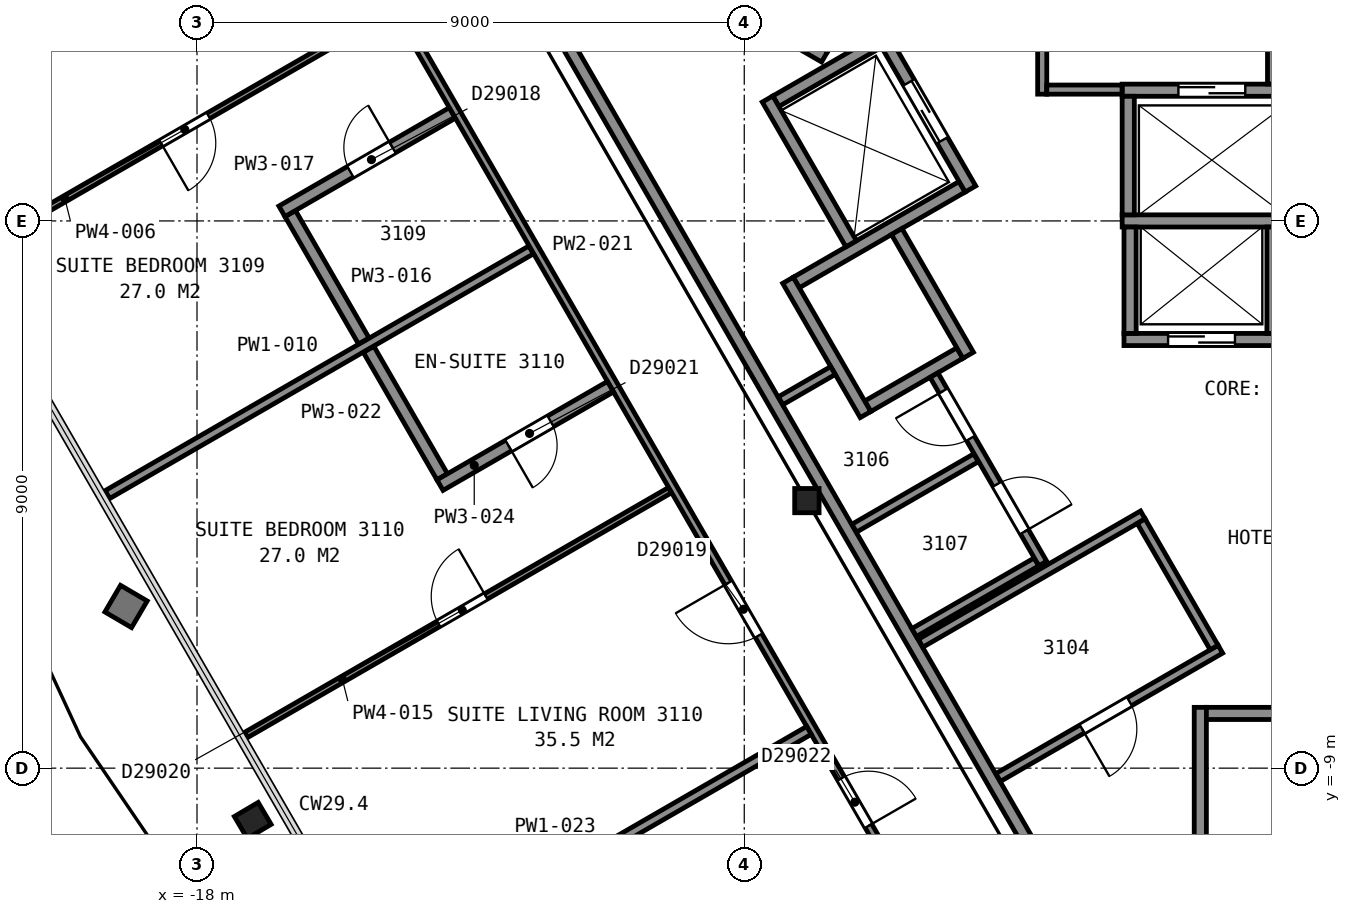
"""IFC4 building model, lengths in metres.
Left out: names, types, materials, properties, quantities, classifications, styles, units other than length and angle.
Written with IfcOpenShell. Run it as: python <this file> out.ifc"""

import sys

from ifc_helpers import new_model, si_unit, direction, frame, frame_2d, origin, origin_2d, place, context, subcontext, project, spatial, rectangle, i_section, extrude, element, fill, save


model = new_model("IFC4")
c1 = context("Model", 3, precision=1e-05, world=origin(), true_north=direction((0.0, 1.0)))
c2 = subcontext(c1, "Body", "Model", "MODEL_VIEW")
j1 = project(units=[si_unit("LENGTHUNIT", "METRE"), si_unit("PLANEANGLEUNIT", "RADIAN")], contexts=[c1])
p1 = place(None, origin())
s1 = spatial("IfcSite", under=j1, at=p1, CompositionType="ELEMENT")
p2 = place(p1, origin())
s2 = spatial("IfcBuilding", under=s1, at=p2, CompositionType="ELEMENT")
p3 = place(p2, frame((0.0, 0.0, 128.8)))
s3 = spatial("IfcBuildingStorey", under=s2, at=p3, CompositionType="ELEMENT", Elevation=128.8)
p4 = place(p3, frame((-16.886, -9.743, 0.035), z_axis=(-0.166257050151, -0.0981255896, 0.981188035975), x_axis=(-0.500024449769, 0.866009245638, 0.001880452815)))
e1 = element("IfcColumn", 1, at=p4, inside=s3, PredefinedType="COLUMN", context=c2, shape_type="SweptSolid", body=[
    extrude(i_section(OverallWidth=0.419, OverallDepth=0.455, WebThickness=0.042, FlangeThickness=0.068, FilletRadius=0.015, at=origin_2d()), origin(), (0.0, 0.0, 1.0), 3.598),
])
p5 = place(p3, frame((-7.97, -4.6, 0.0), z_axis=(0.0, 0.0, 1.0), x_axis=(1.0, 0.0, 0.0)))
e2 = element("IfcColumn", 2, at=p5, inside=s3, PredefinedType="COLUMN", context=c2, shape_type="SweptSolid", body=[
    extrude(i_section(OverallWidth=0.401, OverallDepth=0.399, WebThickness=0.025, FlangeThickness=0.04, FilletRadius=0.015, at=origin_2d()), origin(), (0.0, 0.0, 1.0), 3.6),
])
for number, where, z_axis, x_axis in (
    (3, (-7.678, 2.701, 0.0), (0.0, 0.0, 1.0), (-0.866, 0.5, 0.0)),
    (4, (-1.5, -8.0, 0.0), (0.0, 0.0, 1.0), (0.0, -1.0, 0.0)),
):
    element("IfcWall", number, at=place(p3, frame(where, z_axis=z_axis, x_axis=x_axis)), inside=s3, PredefinedType="PARTITIONING", context=c2, shape_type="SweptSolid", body=[
        extrude(rectangle(XDim=12.0, YDim=0.2, at=frame_2d((6.0, 0.0))), origin(), (0.0, 0.0, 1.0), 3.35),
    ])
p6 = place(p3, frame((-1.4, -8.1, 0.0), z_axis=(0.0, 0.0, 1.0), x_axis=(1.0, 0.0, 0.0)))
e5 = element("IfcWall", 5, at=p6, inside=s3, PredefinedType="PARTITIONING", context=c2, shape_type="SweptSolid", body=[
    extrude(rectangle(XDim=2.8, YDim=0.2, at=frame_2d((1.4, 0.0))), origin(), (0.0, 0.0, 1.0), 3.35),
])
p7 = place(p3, frame((-2.755, -1.95, 0.0), z_axis=(0.0, 0.0, 1.0), x_axis=(1.0, 0.0, 0.0)))
e6 = element("IfcWall", 6, at=p7, inside=s3, PredefinedType="PARTITIONING", context=c2, shape_type="SweptSolid", body=[
    extrude(rectangle(XDim=2.55, YDim=0.2, at=frame_2d((1.275, 0.0))), origin(), (0.0, 0.0, 1.0), 3.6),
])
p8 = place(p7, frame((0.725, 0.0, 0.0)))
e7 = element("IfcOpeningElement", 7, at=p8, cuts=e6, PredefinedType="OPENING", context=c2, shape_type="SweptSolid", body=[
    extrude(rectangle(XDim=1.1, YDim=2.1, at=frame_2d((0.55, 1.05))), frame((0.0, 0.11, 0.0), z_axis=(0.0, -1.0, 0.0), x_axis=(1.0, 0.0, 0.0)), (0.0, 0.0, 1.0), 0.22),
])
p9 = place(p3, frame((-2.785, 0.0, 0.0), z_axis=(0.0, 0.0, 1.0), x_axis=(1.0, 0.0, 0.0)))
e8 = element("IfcWall", 8, at=p9, inside=s3, PredefinedType="PARTITIONING", context=c2, shape_type="SweptSolid", body=[
    extrude(rectangle(XDim=2.95, YDim=0.2, at=frame_2d((1.475, 0.0))), origin(), (0.0, 0.0, 1.0), 3.6),
])
p10 = place(p3, frame((-2.785, 2.15, 0.0), z_axis=(0.0, 0.0, 1.0), x_axis=(1.0, 0.0, 0.0)))
e9 = element("IfcWall", 9, at=p10, inside=s3, PredefinedType="PARTITIONING", context=c2, shape_type="SweptSolid", body=[
    extrude(rectangle(XDim=2.95, YDim=0.2, at=frame_2d((1.475, 0.0))), origin(), (0.0, 0.0, 1.0), 3.6),
])
p11 = place(p10, frame((0.925, 0.0, 0.0)))
e10 = element("IfcOpeningElement", 10, at=p11, cuts=e9, PredefinedType="OPENING", context=c2, shape_type="SweptSolid", body=[
    extrude(rectangle(XDim=1.1, YDim=2.1, at=frame_2d((0.55, 1.05))), frame((0.0, 0.11, 0.0), z_axis=(0.0, -1.0, 0.0), x_axis=(1.0, 0.0, 0.0)), (0.0, 0.0, 1.0), 0.22),
])
p12 = place(p3, frame((-6.97, -3.048, 0.0), z_axis=(0.0, 0.0, 1.0), x_axis=(0.866036909293, 0.499980071345, 0.0)))
e11 = element("IfcWall", 11, at=p12, inside=s3, PredefinedType="PARTITIONING", context=c2, shape_type="SweptSolid", body=[
    extrude(rectangle(XDim=1.75, YDim=0.2, at=frame_2d((0.875, 0.0))), origin(), (0.0, 0.0, 1.0), 3.6),
])
p13 = place(p3, frame((-8.145, -1.013, 0.0), z_axis=(0.0, 0.0, 1.0), x_axis=(0.866016494683, 0.500015430699, 0.0)))
e12 = element("IfcWall", 12, at=p13, inside=s3, PredefinedType="PARTITIONING", context=c2, shape_type="SweptSolid", body=[
    extrude(rectangle(XDim=3.15, YDim=0.2, at=frame_2d((1.575, 0.0))), origin(), (0.0, 0.0, 1.0), 3.6),
])
p14 = place(p3, frame((-8.48, 1.969, 0.0), z_axis=(0.0, 0.0, 1.0), x_axis=(0.866000020948, 0.500043961785, 0.0)))
e13 = element("IfcWall", 13, at=p14, inside=s3, PredefinedType="PARTITIONING", context=c2, shape_type="SweptSolid", body=[
    extrude(rectangle(XDim=1.95, YDim=0.2, at=frame_2d((0.975, 0.0))), origin(), (0.0, 0.0, 1.0), 3.6),
])
for number, where, z_axis, x_axis in (
    (14, (-0.305, -1.85, 0.0), (0.0, 0.0, 1.0), (0.0, 1.0, 0.0)),
    (15, (-2.655, -1.85, 0.0), (0.0, 0.0, 1.0), (0.0, 1.0, 0.0)),
):
    element("IfcWall", number, at=place(p3, frame(where, z_axis=z_axis, x_axis=x_axis)), inside=s3, PredefinedType="PARTITIONING", context=c2, shape_type="SweptSolid", body=[
        extrude(rectangle(XDim=1.75, YDim=0.2, at=frame_2d((0.875, 0.0))), origin(), (0.0, 0.0, 1.0), 3.6),
    ])
p15 = place(p3, frame((-2.685, 0.1, 0.0), z_axis=(0.0, 0.0, 1.0), x_axis=(0.0, 1.0, 0.0)))
e16 = element("IfcWall", 16, at=p15, inside=s3, PredefinedType="PARTITIONING", context=c2, shape_type="SweptSolid", body=[
    extrude(rectangle(XDim=1.95, YDim=0.2, at=frame_2d((0.975, 0.0))), origin(), (0.0, 0.0, 1.0), 3.6),
])
p16 = place(p3, frame((-5.28, 0.525, 0.0), z_axis=(0.0, 0.0, 1.0), x_axis=(-0.500037662692, 0.866003658127, 0.0)))
e17 = element("IfcWall", 17, at=p16, inside=s3, PredefinedType="PARTITIONING", context=c2, shape_type="SweptSolid", body=[
    extrude(rectangle(XDim=2.95, YDim=0.2, at=frame_2d((1.475, 0.0))), origin(), (0.0, 0.0, 1.0), 3.6),
])
p17 = place(p16, frame((0.925, 0.0, 0.0)))
e18 = element("IfcOpeningElement", 18, at=p17, cuts=e17, PredefinedType="OPENING", context=c2, shape_type="SweptSolid", body=[
    extrude(rectangle(XDim=1.1, YDim=2.1, at=frame_2d((0.55, 1.05))), frame((0.0, 0.11, 0.0), z_axis=(0.0, -1.0, 0.0), x_axis=(1.0, 0.0, 0.0)), (0.0, 0.0, 1.0), 0.22),
])
p18 = place(p3, frame((-5.318, -2.21, 0.0), z_axis=(0.0, 0.0, 1.0), x_axis=(-0.499938297808, 0.866061024631, 0.0)))
e19 = element("IfcWall", 19, at=p18, inside=s3, PredefinedType="PARTITIONING", context=c2, shape_type="SweptSolid", body=[
    extrude(rectangle(XDim=2.35, YDim=0.2, at=frame_2d((1.175, 0.0))), origin(), (0.0, 0.0, 1.0), 3.6),
])
p19 = place(p3, frame((-7.242, -0.376, 0.0), z_axis=(0.0, 0.0, 1.0), x_axis=(-0.499996545922, 0.866027397988, 0.0)))
e20 = element("IfcWall", 20, at=p19, inside=s3, PredefinedType="PARTITIONING", context=c2, shape_type="SweptSolid", body=[
    extrude(rectangle(XDim=2.75, YDim=0.2, at=frame_2d((1.375, 0.0))), origin(), (0.0, 0.0, 1.0), 3.6),
])
p20 = place(p3, frame((-7.006, -3.185, 0.0), z_axis=(0.0, 0.0, 1.0), x_axis=(-0.499990435942, 0.866030925526, 0.0)))
e21 = element("IfcWall", 21, at=p20, inside=s3, PredefinedType="PARTITIONING", context=c2, shape_type="SweptSolid", body=[
    extrude(rectangle(XDim=2.55, YDim=0.2, at=frame_2d((1.275, 0.0))), origin(), (0.0, 0.0, 1.0), 3.6),
])
p21 = place(p3, frame((-13.664, 5.946, 0.0), z_axis=(0.0, 0.0, 1.0), x_axis=(0.499994327219, -0.866028678941, 0.0)))
e22 = element("IfcWall", 22, at=p21, inside=s3, PredefinedType="PARTITIONING", context=c2, shape_type="SweptSolid", body=[
    extrude(rectangle(XDim=23.968, YDim=0.2, at=frame_2d((11.984, 0.0))), origin(), (0.0, 0.0, 1.0), 3.35),
])
p22 = place(p3, frame((-8.402, -2.958, 0.0), z_axis=(0.0, 0.0, 1.0), x_axis=(0.866025935826, 0.499999078476, 0.0)))
e23 = element("IfcWall", 23, at=p22, inside=s3, PredefinedType="PARTITIONING", context=c2, shape_type="SweptSolid", body=[
    extrude(rectangle(XDim=0.993, YDim=0.15, at=frame_2d((0.497, 0.0))), origin(), (0.0, 0.0, 1.0), 3.35),
])
p23 = place(p3, frame((-7.192, -5.053, 0.0), z_axis=(0.0, 0.0, 1.0), x_axis=(0.865851878631, 0.500300434011, 0.0)))
e24 = element("IfcWall", 24, at=p23, inside=s3, PredefinedType="PARTITIONING", context=c2, shape_type="SweptSolid", body=[
    extrude(rectangle(XDim=2.315, YDim=0.15, at=frame_2d((1.158, 0.0))), origin(), (0.0, 0.0, 1.0), 3.35),
])
p24 = place(p3, frame((-6.206, -6.77, 0.0), z_axis=(0.0, 0.0, 1.0), x_axis=(0.865998469481, 0.500046648681, 0.0)))
e25 = element("IfcWall", 25, at=p24, inside=s3, PredefinedType="PARTITIONING", context=c2, shape_type="SweptSolid", body=[
    extrude(rectangle(XDim=2.325, YDim=0.15, at=frame_2d((1.163, 0.0))), origin(), (0.0, 0.0, 1.0), 3.35),
])
p25 = place(p3, frame((-6.1, -6.946, 0.0), z_axis=(0.0, 0.0, 1.0), x_axis=(0.866038200431, 0.499977834903, 0.0)))
e26 = element("IfcWall", 26, at=p25, inside=s3, PredefinedType="PARTITIONING", context=c2, shape_type="SweptSolid", body=[
    extrude(rectangle(XDim=4.22, YDim=0.15, at=frame_2d((2.11, 0.0))), origin(), (0.0, 0.0, 1.0), 3.35),
])
p26 = place(p3, frame((-4.091, -5.635, 0.0), z_axis=(0.0, 0.0, 1.0), x_axis=(-0.499948934428, 0.866054884499, 0.0)))
e27 = element("IfcWall", 27, at=p26, inside=s3, PredefinedType="PARTITIONING", context=c2, shape_type="SweptSolid", body=[
    extrude(rectangle(XDim=3.577, YDim=0.15, at=frame_2d((1.789, 0.0))), origin(), (0.0, 0.0, 1.0), 3.35),
])
p27 = place(p26, frame((2.377, 0.0, 0.0)))
e28 = element("IfcOpeningElement", 28, at=p27, cuts=e27, PredefinedType="OPENING", context=c2, shape_type="SweptSolid", body=[
    extrude(rectangle(XDim=0.9, YDim=2.1, at=frame_2d((0.45, 1.05))), frame((0.0, 0.085, 0.0), z_axis=(0.0, -1.0, 0.0), x_axis=(1.0, 0.0, 0.0)), (0.0, 0.0, 1.0), 0.17),
])
p28 = place(p26, frame((0.605, 0.0, 0.0)))
e29 = element("IfcOpeningElement", 29, at=p28, cuts=e27, PredefinedType="OPENING", context=c2, shape_type="SweptSolid", body=[
    extrude(rectangle(XDim=0.9, YDim=2.1, at=frame_2d((0.45, 1.05))), frame((0.0, 0.085, 0.0), z_axis=(0.0, -1.0, 0.0), x_axis=(1.0, 0.0, 0.0)), (0.0, 0.0, 1.0), 0.17),
])
p29 = place(p3, frame((-4.825, -9.154, 0.0), z_axis=(0.0, 0.0, 1.0), x_axis=(0.866023738697, 0.500002884005, 0.0)))
e30 = element("IfcWall", 30, at=p29, inside=s3, PredefinedType="PARTITIONING", context=c2, shape_type="SweptSolid", body=[
    extrude(rectangle(XDim=4.22, YDim=0.15, at=frame_2d((2.11, 0.0))), origin(), (0.0, 0.0, 1.0), 3.35),
])
p30 = place(p29, frame((1.595, 0.0, 0.0)))
e31 = element("IfcOpeningElement", 31, at=p30, cuts=e30, PredefinedType="OPENING", context=c2, shape_type="SweptSolid", body=[
    extrude(rectangle(XDim=0.9, YDim=2.1, at=frame_2d((0.45, 1.05))), frame((0.0, 0.085, 0.0), z_axis=(0.0, -1.0, 0.0), x_axis=(1.0, 0.0, 0.0)), (0.0, 0.0, 1.0), 0.17),
])
p31 = place(p3, frame((-4.1, 2.085, 0.0), z_axis=(0.0, 0.0, 1.0), x_axis=(0.0, 1.0, 0.0)))
e32 = element("IfcWall", 32, at=p31, inside=s3, PredefinedType="PARTITIONING", context=c2, shape_type="SweptSolid", body=[
    extrude(rectangle(XDim=3.523, YDim=0.15, at=frame_2d((1.761, 0.0))), origin(), (0.0, 0.0, 1.0), 3.35),
])
p32 = place(p3, frame((-4.025, 2.16, 0.0), z_axis=(0.0, 0.0, 1.0), x_axis=(1.0, 0.0, 0.0)))
e33 = element("IfcWall", 33, at=p32, inside=s3, PredefinedType="PARTITIONING", context=c2, shape_type="SweptSolid", body=[
    extrude(rectangle(XDim=1.238, YDim=0.15, at=frame_2d((0.619, 0.0))), origin(), (0.0, 0.0, 1.0), 3.35),
])
p33 = place(p3, frame((-2.472, -4.938, 0.0), z_axis=(0.0, 0.0, 1.0), x_axis=(0.500045362686, -0.865999212041, 0.0)))
e34 = element("IfcWall", 34, at=p33, inside=s3, PredefinedType="PARTITIONING", context=c2, shape_type="SweptSolid", body=[
    extrude(rectangle(XDim=2.4, YDim=0.15, at=frame_2d((1.2, 0.0))), origin(), (0.0, 0.0, 1.0), 3.35),
])
p34 = place(p3, frame((-0.32, 2.252, 0.0), z_axis=(0.0, 0.0, 1.0), x_axis=(0.0, 1.0, 0.0)))
e35 = element("IfcWall", 35, at=p34, inside=s3, PredefinedType="PARTITIONING", context=c2, shape_type="SweptSolid", body=[
    extrude(rectangle(XDim=4.063, YDim=0.15, at=frame_2d((2.031, 0.0))), origin(), (0.0, 0.0, 1.0), 3.35),
])
p35 = place(p3, frame((-14.782, 3.478, 0.0), z_axis=(0.0, 0.0, 1.0), x_axis=(-0.866049767202, -0.499957798949, 0.0)))
e36 = element("IfcWall", 36, at=p35, inside=s3, PredefinedType="PARTITIONING", context=c2, shape_type="SweptSolid", body=[
    extrude(rectangle(XDim=8.052, YDim=0.1, at=frame_2d((4.026, 0.0))), origin(), (0.0, 0.0, 1.0), 2.613),
])
p36 = place(p35, frame((3.498, 0.0, 0.0)))
e37 = element("IfcOpeningElement", 37, at=p36, cuts=e36, PredefinedType="OPENING", context=c2, shape_type="SweptSolid", body=[
    extrude(rectangle(XDim=0.9, YDim=2.1, at=frame_2d((0.45, 1.05))), frame((0.0, 0.06, 0.0), z_axis=(0.0, -1.0, 0.0), x_axis=(1.0, 0.0, 0.0)), (0.0, 0.0, 1.0), 0.12),
])
p37 = place(p3, frame((-19.473, -4.501, 0.0), z_axis=(0.0, 0.0, 1.0), x_axis=(0.866005217449, 0.50003496213, 0.0)))
e38 = element("IfcWall", 38, at=p37, inside=s3, PredefinedType="PARTITIONING", context=c2, shape_type="SweptSolid", body=[
    extrude(rectangle(XDim=8.047, YDim=0.15, at=frame_2d((4.024, 0.0))), origin(), (0.0, 0.0, 1.0), 2.613),
])
p38 = place(p3, frame((-17.192, -8.453, 0.0), z_axis=(0.0, 0.0, 1.0), x_axis=(0.865999665789, 0.500044576866, 0.0)))
e39 = element("IfcWall", 39, at=p38, inside=s3, PredefinedType="PARTITIONING", context=c2, shape_type="SweptSolid", body=[
    extrude(rectangle(XDim=8.048, YDim=0.1, at=frame_2d((4.024, 0.0))), origin(), (0.0, 0.0, 1.0), 2.613),
])
p39 = place(p38, frame((3.654, 0.0, 0.0)))
e40 = element("IfcOpeningElement", 40, at=p39, cuts=e39, PredefinedType="OPENING", context=c2, shape_type="SweptSolid", body=[
    extrude(rectangle(XDim=0.9, YDim=2.1, at=frame_2d((0.45, 1.05))), frame((0.0, 0.06, 0.0), z_axis=(0.0, -1.0, 0.0), x_axis=(1.0, 0.0, 0.0)), (0.0, 0.0, 1.0), 0.12),
])
p40 = place(p3, frame((-16.467, 0.121, 0.0), z_axis=(0.0, 0.0, 1.0), x_axis=(0.499894243479, -0.866086453731, 0.0)))
e41 = element("IfcWall", 41, at=p40, inside=s3, PredefinedType="PARTITIONING", context=c2, shape_type="SweptSolid", body=[
    extrude(rectangle(XDim=2.419, YDim=0.2, at=frame_2d((1.21, 0.0))), origin(), (0.0, 0.0, 1.0), 2.613),
])
p41 = place(p3, frame((-13.8, 1.777, 0.0), z_axis=(0.0, 0.0, 1.0), x_axis=(-0.865983377851, -0.500072783988, 0.0)))
e42 = element("IfcWall", 42, at=p41, inside=s3, PredefinedType="PARTITIONING", context=c2, shape_type="SweptSolid", body=[
    extrude(rectangle(XDim=3.237, YDim=0.2, at=frame_2d((1.619, 0.0))), origin(), (0.0, 0.0, 1.0), 2.613),
])
p42 = place(p41, frame((1.137, 0.0, 0.0)))
e43 = element("IfcOpeningElement", 43, at=p42, cuts=e42, PredefinedType="OPENING", context=c2, shape_type="SweptSolid", body=[
    extrude(rectangle(XDim=0.8, YDim=2.1, at=frame_2d((0.4, 1.05))), frame((0.0, 0.11, 0.0), z_axis=(0.0, -1.0, 0.0), x_axis=(1.0, 0.0, 0.0)), (0.0, 0.0, 1.0), 0.22),
])
p43 = place(p3, frame((-3.756, -15.494, 0.0), z_axis=(0.0, 0.0, 1.0), x_axis=(-0.500027787016, 0.866009360349, 0.0)))
e44 = element("IfcWall", 44, at=p43, inside=s3, PredefinedType="PARTITIONING", context=c2, shape_type="SweptSolid", body=[
    extrude(rectangle(XDim=23.856, YDim=0.125, at=frame_2d((11.928, 0.0))), origin(), (0.0, 0.0, 1.0), 2.613),
])
p44 = place(p43, frame((10.016, 0.0, 0.0)))
e45 = element("IfcOpeningElement", 45, at=p44, cuts=e44, PredefinedType="OPENING", context=c2, shape_type="SweptSolid", body=[
    extrude(rectangle(XDim=1.0, YDim=2.1, at=frame_2d((0.5, 1.05))), frame((0.0, 0.073, 0.0), z_axis=(0.0, -1.0, 0.0), x_axis=(1.0, 0.0, 0.0)), (0.0, 0.0, 1.0), 0.145),
])
p45 = place(p43, frame((6.402, 0.0, 0.0)))
e46 = element("IfcOpeningElement", 46, at=p45, cuts=e44, PredefinedType="OPENING", context=c2, shape_type="SweptSolid", body=[
    extrude(rectangle(XDim=0.9, YDim=2.1, at=frame_2d((0.45, 1.05))), frame((0.0, 0.073, 0.0), z_axis=(0.0, -1.0, 0.0), x_axis=(1.0, 0.0, 0.0)), (0.0, 0.0, 1.0), 0.145),
])
p46 = place(p3, frame((-15.177, -2.113, 0.0), z_axis=(0.0, 0.0, 1.0), x_axis=(0.500196916118, -0.865911684357, 0.0)))
e47 = element("IfcWall", 47, at=p46, inside=s3, PredefinedType="PARTITIONING", context=c2, shape_type="SweptSolid", body=[
    extrude(rectangle(XDim=2.42, YDim=0.2, at=frame_2d((1.21, 0.0))), origin(), (0.0, 0.0, 1.0), 2.613),
])
p47 = place(p3, frame((-14.91, -12.405, 0.0), z_axis=(0.0, 0.0, 1.0), x_axis=(0.866044217767, 0.499967411811, 0.0)))
e48 = element("IfcWall", 48, at=p47, inside=s3, PredefinedType="PARTITIONING", context=c2, shape_type="SweptSolid", body=[
    extrude(rectangle(XDim=8.052, YDim=0.15, at=frame_2d((4.026, 0.0))), origin(), (0.0, 0.0, 1.0), 2.613),
])
p48 = place(p3, frame((-14.004, -4.345, 0.0), z_axis=(0.0, 0.0, 1.0), x_axis=(0.866016035791, 0.500016225489, 0.0)))
e49 = element("IfcWall", 49, at=p48, inside=s3, PredefinedType="PARTITIONING", context=c2, shape_type="SweptSolid", body=[
    extrude(rectangle(XDim=3.237, YDim=0.2, at=frame_2d((1.619, 0.0))), origin(), (0.0, 0.0, 1.0), 2.613),
])
p49 = place(p48, frame((1.3, 0.0, 0.0)))
e50 = element("IfcOpeningElement", 50, at=p49, cuts=e49, PredefinedType="OPENING", context=c2, shape_type="SweptSolid", body=[
    extrude(rectangle(XDim=0.8, YDim=2.1, at=frame_2d((0.4, 1.05))), frame((0.0, 0.11, 0.0), z_axis=(0.0, -1.0, 0.0), x_axis=(1.0, 0.0, 0.0)), (0.0, 0.0, 1.0), 0.22),
])
p50 = place(p8, origin())
e51 = element("IfcDoor", 51, at=p50, inside=s3, OperationType="SLIDING_TO_RIGHT", PredefinedType="DOOR", context=c2, shape_type="SweptSolid", body=[
    extrude(rectangle(XDim=1.1, YDim=2.1, at=frame_2d((0.55, 1.05))), frame((0.0, 0.025, 0.0), z_axis=(0.0, -1.0, 0.0), x_axis=(1.0, 0.0, 0.0)), (0.0, 0.0, 1.0), 0.05),
])
fill(e7, e51)
p51 = place(p11, origin())
e52 = element("IfcDoor", 52, at=p51, inside=s3, OperationType="SLIDING_TO_LEFT", PredefinedType="DOOR", context=c2, shape_type="SweptSolid", body=[
    extrude(rectangle(XDim=1.1, YDim=2.1, at=frame_2d((0.55, 1.05))), frame((0.0, 0.025, 0.0), z_axis=(0.0, -1.0, 0.0), x_axis=(1.0, 0.0, 0.0)), (0.0, 0.0, 1.0), 0.05),
])
fill(e10, e52)
p52 = place(p17, origin())
e53 = element("IfcDoor", 53, at=p52, inside=s3, OperationType="SLIDING_TO_LEFT", PredefinedType="DOOR", context=c2, shape_type="SweptSolid", body=[
    extrude(rectangle(XDim=1.1, YDim=2.1, at=frame_2d((0.55, 1.05))), frame((0.0, 0.025, 0.0), z_axis=(0.0, -1.0, 0.0), x_axis=(1.0, 0.0, 0.0)), (0.0, 0.0, 1.0), 0.05),
])
fill(e18, e53)
p53 = place(p27, origin())
e54 = element("IfcDoor", 54, at=p53, inside=s3, OperationType="SINGLE_SWING_RIGHT", PredefinedType="DOOR", context=c2, shape_type="SweptSolid", body=[
    extrude(rectangle(XDim=0.9, YDim=2.1, at=frame_2d((0.45, 1.05))), frame((0.0, 0.025, 0.0), z_axis=(0.0, -1.0, 0.0), x_axis=(1.0, 0.0, 0.0)), (0.0, 0.0, 1.0), 0.05),
])
fill(e28, e54)
p54 = place(p28, origin())
e55 = element("IfcDoor", 55, at=p54, inside=s3, OperationType="SINGLE_SWING_LEFT", PredefinedType="DOOR", context=c2, shape_type="SweptSolid", body=[
    extrude(rectangle(XDim=0.9, YDim=2.1, at=frame_2d((0.45, 1.05))), frame((0.0, 0.025, 0.0), z_axis=(0.0, -1.0, 0.0), x_axis=(1.0, 0.0, 0.0)), (0.0, 0.0, 1.0), 0.05),
])
fill(e29, e55)
p55 = place(p30, origin())
e56 = element("IfcDoor", 56, at=p55, inside=s3, OperationType="SINGLE_SWING_LEFT", PredefinedType="DOOR", context=c2, shape_type="SweptSolid", body=[
    extrude(rectangle(XDim=0.9, YDim=2.1, at=frame_2d((0.45, 1.05))), frame((0.0, 0.025, 0.0), z_axis=(0.0, -1.0, 0.0), x_axis=(1.0, 0.0, 0.0)), (0.0, 0.0, 1.0), 0.05),
])
fill(e31, e56)
p56 = place(p36, origin())
e57 = element("IfcDoor", 57, at=p56, inside=s3, OperationType="SINGLE_SWING_RIGHT", PredefinedType="DOOR", context=c2, shape_type="SweptSolid", body=[
    extrude(rectangle(XDim=0.9, YDim=2.1, at=frame_2d((0.45, 1.05))), frame((0.0, 0.025, 0.0), z_axis=(0.0, -1.0, 0.0), x_axis=(1.0, 0.0, 0.0)), (0.0, 0.0, 1.0), 0.05),
])
fill(e37, e57)
p57 = place(p39, origin())
e58 = element("IfcDoor", 58, at=p57, inside=s3, OperationType="SINGLE_SWING_RIGHT", PredefinedType="DOOR", context=c2, shape_type="SweptSolid", body=[
    extrude(rectangle(XDim=0.9, YDim=2.1, at=frame_2d((0.45, 1.05))), frame((0.0, 0.025, 0.0), z_axis=(0.0, -1.0, 0.0), x_axis=(1.0, 0.0, 0.0)), (0.0, 0.0, 1.0), 0.05),
])
fill(e40, e58)
p58 = place(p42, origin())
e59 = element("IfcDoor", 59, at=p58, inside=s3, OperationType="SINGLE_SWING_LEFT", PredefinedType="DOOR", context=c2, shape_type="SweptSolid", body=[
    extrude(rectangle(XDim=0.8, YDim=2.1, at=frame_2d((0.4, 1.05))), frame((0.0, 0.025, 0.0), z_axis=(0.0, -1.0, 0.0), x_axis=(1.0, 0.0, 0.0)), (0.0, 0.0, 1.0), 0.05),
])
fill(e43, e59)
p59 = place(p44, origin())
e60 = element("IfcDoor", 60, at=p59, inside=s3, OperationType="SINGLE_SWING_RIGHT", PredefinedType="DOOR", context=c2, shape_type="SweptSolid", body=[
    extrude(rectangle(XDim=1.0, YDim=2.1, at=frame_2d((0.5, 1.05))), frame((0.0, 0.025, 0.0), z_axis=(0.0, -1.0, 0.0), x_axis=(1.0, 0.0, 0.0)), (0.0, 0.0, 1.0), 0.05),
])
fill(e45, e60)
p60 = place(p45, origin())
e61 = element("IfcDoor", 61, at=p60, inside=s3, OperationType="SINGLE_SWING_LEFT", PredefinedType="DOOR", context=c2, shape_type="SweptSolid", body=[
    extrude(rectangle(XDim=0.9, YDim=2.1, at=frame_2d((0.45, 1.05))), frame((0.0, 0.025, 0.0), z_axis=(0.0, -1.0, 0.0), x_axis=(1.0, 0.0, 0.0)), (0.0, 0.0, 1.0), 0.05),
])
fill(e46, e61)
p61 = place(p49, origin())
e62 = element("IfcDoor", 62, at=p61, inside=s3, OperationType="SINGLE_SWING_LEFT", PredefinedType="DOOR", context=c2, shape_type="SweptSolid", body=[
    extrude(rectangle(XDim=0.8, YDim=2.1, at=frame_2d((0.4, 1.05))), frame((0.0, 0.025, 0.0), z_axis=(0.0, -1.0, 0.0), x_axis=(1.0, 0.0, 0.0)), (0.0, 0.0, 1.0), 0.05),
])
fill(e50, e62)
save(model, sys.argv[1])
